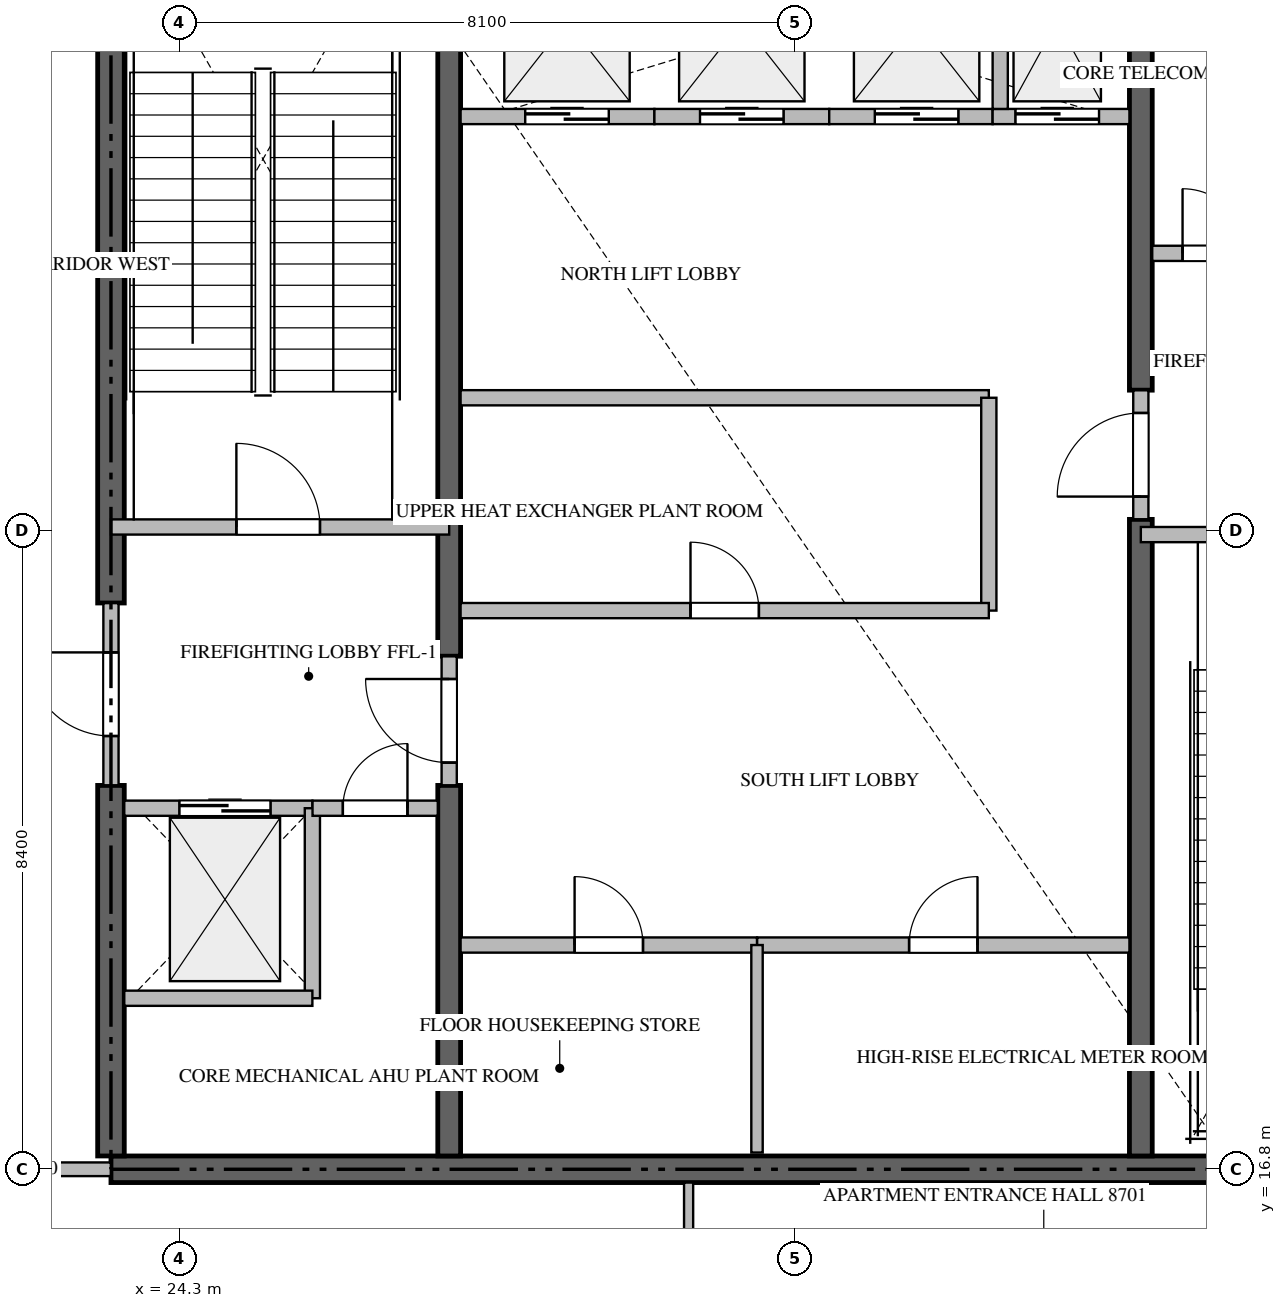
"""IFC4 building model, lengths in metres.
Left out: names, types, materials, properties, quantities, classifications, styles, units other than length and angle.
Written with IfcOpenShell. Run it as: python <this file> out.ifc"""

import sys

from ifc_helpers import new_model, si_unit, direction, frame, frame_2d, origin, place, context, subcontext, project, spatial, rectangle, extrude, source, transform, mapped, element, fill, save


model = new_model("IFC4")
c1 = context("Model", 3, precision=1e-05, world=origin(), true_north=direction((0.0, 1.0)))
c2 = subcontext(c1, "Body", "Model", "MODEL_VIEW")
j1 = project(units=[si_unit("LENGTHUNIT", "METRE"), si_unit("PLANEANGLEUNIT", "RADIAN")], contexts=[c1])
p1 = place(None, origin())
s1 = spatial("IfcSite", under=j1, at=p1, CompositionType="ELEMENT")
p2 = place(p1, origin())
s2 = spatial("IfcBuilding", under=s1, at=p2, CompositionType="ELEMENT")
p3 = place(p2, frame((0.0, 0.0, 353.85)))
s3 = spatial("IfcBuildingStorey", under=s2, at=p3, CompositionType="ELEMENT", Elevation=353.85)
p4 = place(p3, frame((23.4, 16.8, -0.26), z_axis=(0.0, 0.0, 1.0), x_axis=(1.0, 0.0, 0.0)))
e1 = element("IfcWall", 1, at=p4, inside=s3, PredefinedType="SHEAR", context=c2, shape_type="SweptSolid", body=[
    extrude(rectangle(XDim=18.0, YDim=0.35, at=frame_2d((9.0, 0.0))), origin(), (0.0, 0.0, 1.0), 5.798),
])
p5 = place(p3, frame((23.4, 16.975, -0.26), z_axis=(0.0, 0.0, 1.0), x_axis=(0.0, 1.0, 0.0)))
e2 = element("IfcWall", 2, at=p5, inside=s3, PredefinedType="SHEAR", context=c2, shape_type="SweptSolid", body=[
    extrude(rectangle(XDim=4.875, YDim=0.35, at=frame_2d((2.438, 0.0))), origin(), (0.0, 0.0, 1.0), 5.798),
])
p6 = place(p3, frame((23.4, 24.25, -0.26), z_axis=(0.0, 0.0, 1.0), x_axis=(0.0, 1.0, 0.0)))
e3 = element("IfcWall", 3, at=p6, inside=s3, PredefinedType="SHEAR", context=c2, shape_type="SweptSolid", body=[
    extrude(rectangle(XDim=9.175, YDim=0.35, at=frame_2d((4.587, 0.0))), origin(), (0.0, 0.0, 1.0), 5.798),
])
p7 = place(p3, frame((27.85, 16.975, -0.26), z_axis=(0.0, 0.0, 1.0), x_axis=(0.0, 1.0, 0.0)))
e4 = element("IfcWall", 4, at=p7, inside=s3, PredefinedType="SHEAR", context=c2, shape_type="SweptSolid", body=[
    extrude(rectangle(XDim=4.875, YDim=0.3, at=frame_2d((2.438, 0.0))), origin(), (0.0, 0.0, 1.0), 5.798),
])
p8 = place(p3, frame((27.85, 23.55, -0.26), z_axis=(0.0, 0.0, 1.0), x_axis=(0.0, 1.0, 0.0)))
e5 = element("IfcWall", 5, at=p8, inside=s3, PredefinedType="SHEAR", context=c2, shape_type="SweptSolid", body=[
    extrude(rectangle(XDim=9.875, YDim=0.3, at=frame_2d((4.938, 0.0))), origin(), (0.0, 0.0, 1.0), 5.798),
])
p9 = place(p3, frame((36.95, 16.975, -0.26), z_axis=(0.0, 0.0, 1.0), x_axis=(0.0, 1.0, 0.0)))
e6 = element("IfcWall", 6, at=p9, inside=s3, PredefinedType="SHEAR", context=c2, shape_type="SweptSolid", body=[
    extrude(rectangle(XDim=8.375, YDim=0.3, at=frame_2d((4.188, 0.0))), origin(), (0.0, 0.0, 1.0), 5.798),
])
p10 = place(p3, frame((36.95, 27.05, -0.26), z_axis=(0.0, 0.0, 1.0), x_axis=(0.0, 1.0, 0.0)))
e7 = element("IfcWall", 7, at=p10, inside=s3, PredefinedType="SHEAR", context=c2, shape_type="SweptSolid", body=[
    extrude(rectangle(XDim=6.375, YDim=0.3, at=frame_2d((3.188, 0.0))), origin(), (0.0, 0.0, 1.0), 5.798),
])
p11 = place(p3, frame((23.4, 25.25, 0.0), z_axis=(0.0, 0.0, 1.0), x_axis=(1.0, 0.0, 0.0)))
e8 = element("IfcWall", 8, at=p11, inside=s3, PredefinedType="STANDARD", context=c2, shape_type="SweptSolid", body=[
    extrude(rectangle(XDim=4.45, YDim=0.2, at=frame_2d((2.225, 0.0))), origin(), (0.0, 0.0, 1.0), 5.54),
])
p12 = place(p11, frame((1.65, 0.0, 0.0)))
e9 = element("IfcOpeningElement", 9, at=p12, cuts=e8, PredefinedType="OPENING", context=c2, shape_type="SweptSolid", body=[
    extrude(rectangle(XDim=1.1, YDim=2.15, at=frame_2d((0.55, 1.075))), frame((0.0, 0.11, 0.0), z_axis=(0.0, -1.0, 0.0), x_axis=(1.0, 0.0, 0.0)), (0.0, 0.0, 1.0), 0.22),
])
p13 = place(p3, frame((36.95, 25.15, 0.0), z_axis=(0.0, 0.0, 1.0), x_axis=(1.0, 0.0, 0.0)))
e10 = element("IfcWall", 10, at=p13, inside=s3, PredefinedType="STANDARD", context=c2, shape_type="SweptSolid", body=[
    extrude(rectangle(XDim=4.45, YDim=0.2, at=frame_2d((2.225, 0.0))), origin(), (0.0, 0.0, 1.0), 5.54),
])
p14 = place(p13, frame((1.65, 0.0, 0.0)))
e11 = element("IfcOpeningElement", 11, at=p14, cuts=e10, PredefinedType="OPENING", context=c2, shape_type="SweptSolid", body=[
    extrude(rectangle(XDim=1.1, YDim=2.15, at=frame_2d((0.55, 1.075))), frame((0.0, 0.11, 0.0), z_axis=(0.0, -1.0, 0.0), x_axis=(1.0, 0.0, 0.0)), (0.0, 0.0, 1.0), 0.22),
])
p15 = place(p3, frame((23.575, 21.55, 0.0), z_axis=(0.0, 0.0, 1.0), x_axis=(1.0, 0.0, 0.0)))
e12 = element("IfcWall", 12, at=p15, inside=s3, PredefinedType="STANDARD", context=c2, shape_type="SweptSolid", body=[
    extrude(rectangle(XDim=2.475, YDim=0.2, at=frame_2d((1.238, 0.0))), origin(), (0.0, 0.0, 1.0), 5.54),
])
p16 = place(p15, frame((0.725, 0.0, 0.0)))
e13 = element("IfcOpeningElement", 13, at=p16, cuts=e12, PredefinedType="OPENING", context=c2, shape_type="SweptSolid", body=[
    extrude(rectangle(XDim=1.2, YDim=2.2, at=frame_2d((0.6, 1.1))), frame((0.0, 0.11, 0.0), z_axis=(0.0, -1.0, 0.0), x_axis=(1.0, 0.0, 0.0)), (0.0, 0.0, 1.0), 0.22),
])
p17 = place(p3, frame((28.0, 30.65, 0.0), z_axis=(0.0, 0.0, 1.0), x_axis=(1.0, 0.0, 0.0)))
e14 = element("IfcWall", 14, at=p17, inside=s3, PredefinedType="STANDARD", context=c2, shape_type="SweptSolid", body=[
    extrude(rectangle(XDim=2.55, YDim=0.2, at=frame_2d((1.275, 0.0))), origin(), (0.0, 0.0, 1.0), 5.54),
])
p18 = place(p17, frame((0.85, 0.0, 0.0)))
e15 = element("IfcOpeningElement", 15, at=p18, cuts=e14, PredefinedType="OPENING", context=c2, shape_type="SweptSolid", body=[
    extrude(rectangle(XDim=1.1, YDim=2.2, at=frame_2d((0.55, 1.1))), frame((0.0, 0.11, 0.0), z_axis=(0.0, -1.0, 0.0), x_axis=(1.0, 0.0, 0.0)), (0.0, 0.0, 1.0), 0.22),
])
p19 = place(p3, frame((30.55, 30.65, 0.0), z_axis=(0.0, 0.0, 1.0), x_axis=(1.0, 0.0, 0.0)))
e16 = element("IfcWall", 16, at=p19, inside=s3, PredefinedType="STANDARD", context=c2, shape_type="SweptSolid", body=[
    extrude(rectangle(XDim=2.3, YDim=0.2, at=frame_2d((1.15, 0.0))), origin(), (0.0, 0.0, 1.0), 5.54),
])
p20 = place(p19, frame((0.6, 0.0, 0.0)))
e17 = element("IfcOpeningElement", 17, at=p20, cuts=e16, PredefinedType="OPENING", context=c2, shape_type="SweptSolid", body=[
    extrude(rectangle(XDim=1.1, YDim=2.2, at=frame_2d((0.55, 1.1))), frame((0.0, 0.11, 0.0), z_axis=(0.0, -1.0, 0.0), x_axis=(1.0, 0.0, 0.0)), (0.0, 0.0, 1.0), 0.22),
])
p21 = place(p3, frame((32.85, 30.65, 0.0), z_axis=(0.0, 0.0, 1.0), x_axis=(1.0, 0.0, 0.0)))
e18 = element("IfcWall", 18, at=p21, inside=s3, PredefinedType="STANDARD", context=c2, shape_type="SweptSolid", body=[
    extrude(rectangle(XDim=2.15, YDim=0.2, at=frame_2d((1.075, 0.0))), origin(), (0.0, 0.0, 1.0), 5.54),
])
p22 = place(p21, frame((0.6, 0.0, 0.0)))
e19 = element("IfcOpeningElement", 19, at=p22, cuts=e18, PredefinedType="OPENING", context=c2, shape_type="SweptSolid", body=[
    extrude(rectangle(XDim=1.1, YDim=2.2, at=frame_2d((0.55, 1.1))), frame((0.0, 0.11, 0.0), z_axis=(0.0, -1.0, 0.0), x_axis=(1.0, 0.0, 0.0)), (0.0, 0.0, 1.0), 0.22),
])
p23 = place(p3, frame((35.0, 30.65, 0.0), z_axis=(0.0, 0.0, 1.0), x_axis=(1.0, 0.0, 0.0)))
e20 = element("IfcWall", 20, at=p23, inside=s3, PredefinedType="STANDARD", context=c2, shape_type="SweptSolid", body=[
    extrude(rectangle(XDim=1.8, YDim=0.2, at=frame_2d((0.9, 0.0))), origin(), (0.0, 0.0, 1.0), 5.54),
])
p24 = place(p23, frame((0.3, 0.0, 0.0)))
e21 = element("IfcOpeningElement", 21, at=p24, cuts=e20, PredefinedType="OPENING", context=c2, shape_type="SweptSolid", body=[
    extrude(rectangle(XDim=1.1, YDim=2.2, at=frame_2d((0.55, 1.1))), frame((0.0, 0.11, 0.0), z_axis=(0.0, -1.0, 0.0), x_axis=(1.0, 0.0, 0.0)), (0.0, 0.0, 1.0), 0.22),
])
p25 = place(p3, frame((35.1, 30.75, 0.0), z_axis=(0.0, 0.0, 1.0), x_axis=(0.0, 1.0, 0.0)))
e22 = element("IfcWall", 22, at=p25, inside=s3, PredefinedType="STANDARD", context=c2, shape_type="SweptSolid", body=[
    extrude(rectangle(XDim=2.675, YDim=0.2, at=frame_2d((1.337, 0.0))), origin(), (0.0, 0.0, 1.0), 5.54),
])
p26 = place(p3, frame((26.05, 19.05, 0.0), z_axis=(0.0, 0.0, 1.0), x_axis=(0.0, 1.0, 0.0)))
e23 = element("IfcWall", 23, at=p26, inside=s3, PredefinedType="STANDARD", context=c2, shape_type="SweptSolid", body=[
    extrude(rectangle(XDim=2.5, YDim=0.2, at=frame_2d((1.25, 0.0))), origin(), (0.0, 0.0, 1.0), 5.54),
])
p27 = place(p3, frame((23.575, 19.05, 0.0), z_axis=(0.0, 0.0, 1.0), x_axis=(1.0, 0.0, 0.0)))
e24 = element("IfcWall", 24, at=p27, inside=s3, PredefinedType="STANDARD", context=c2, shape_type="SweptSolid", body=[
    extrude(rectangle(XDim=2.475, YDim=0.2, at=frame_2d((1.238, 0.0))), origin(), (0.0, 0.0, 1.0), 5.54),
])
p28 = place(p3, frame((26.052, 21.55, 0.0), z_axis=(0.0, 0.0, 1.0), x_axis=(1.0, 0.0, 0.0)))
e25 = element("IfcWall", 25, at=p28, inside=s3, PredefinedType="STANDARD", context=c2, shape_type="SweptSolid", body=[
    extrude(rectangle(XDim=1.648, YDim=0.2, at=frame_2d((0.824, 0.0))), origin(), (0.0, 0.0, 1.0), 5.54),
])
p29 = place(p28, frame((0.399, 0.0, 0.0)))
e26 = element("IfcOpeningElement", 26, at=p29, cuts=e25, PredefinedType="OPENING", context=c2, shape_type="SweptSolid", body=[
    extrude(rectangle(XDim=0.85, YDim=2.1, at=frame_2d((0.425, 1.05))), frame((0.0, 0.11, 0.0), z_axis=(0.0, -1.0, 0.0), x_axis=(1.0, 0.0, 0.0)), (0.0, 0.0, 1.0), 0.22),
])
p30 = place(p3, frame((37.1, 28.85, 0.0), z_axis=(0.0, 0.0, 1.0), x_axis=(1.0, 0.0, 0.0)))
e27 = element("IfcWall", 27, at=p30, inside=s3, PredefinedType="STANDARD", context=c2, shape_type="SweptSolid", body=[
    extrude(rectangle(XDim=1.648, YDim=0.2, at=frame_2d((0.824, 0.0))), origin(), (0.0, 0.0, 1.0), 5.54),
])
p31 = place(p30, frame((0.399, 0.0, 0.0)))
e28 = element("IfcOpeningElement", 28, at=p31, cuts=e27, PredefinedType="OPENING", context=c2, shape_type="SweptSolid", body=[
    extrude(rectangle(XDim=0.85, YDim=2.1, at=frame_2d((0.425, 1.05))), frame((0.0, 0.11, 0.0), z_axis=(0.0, -1.0, 0.0), x_axis=(1.0, 0.0, 0.0)), (0.0, 0.0, 1.0), 0.22),
])
p32 = place(p3, frame((23.4, 21.852, 0.0), z_axis=(0.0, 0.0, 1.0), x_axis=(0.0, 1.0, 0.0)))
e29 = element("IfcWall", 29, at=p32, inside=s3, PredefinedType="STANDARD", context=c2, shape_type="SweptSolid", body=[
    extrude(rectangle(XDim=2.396, YDim=0.2, at=frame_2d((1.198, 0.0))), origin(), (0.0, 0.0, 1.0), 5.54),
])
p33 = place(p32, frame((0.648, 0.0, 0.0)))
e30 = element("IfcOpeningElement", 30, at=p33, cuts=e29, PredefinedType="OPENING", context=c2, shape_type="SweptSolid", body=[
    extrude(rectangle(XDim=1.1, YDim=2.15, at=frame_2d((0.55, 1.075))), frame((0.0, 0.11, 0.0), z_axis=(0.0, -1.0, 0.0), x_axis=(1.0, 0.0, 0.0)), (0.0, 0.0, 1.0), 0.22),
])
p34 = place(p3, frame((27.85, 21.852, 0.0), z_axis=(0.0, 0.0, 1.0), x_axis=(0.0, 1.0, 0.0)))
e31 = element("IfcWall", 31, at=p34, inside=s3, PredefinedType="STANDARD", context=c2, shape_type="SweptSolid", body=[
    extrude(rectangle(XDim=1.696, YDim=0.2, at=frame_2d((0.848, 0.0))), origin(), (0.0, 0.0, 1.0), 5.54),
])
p35 = place(p34, frame((0.298, 0.0, 0.0)))
e32 = element("IfcOpeningElement", 32, at=p35, cuts=e31, PredefinedType="OPENING", context=c2, shape_type="SweptSolid", body=[
    extrude(rectangle(XDim=1.1, YDim=2.15, at=frame_2d((0.55, 1.075))), frame((0.0, 0.11, 0.0), z_axis=(0.0, -1.0, 0.0), x_axis=(1.0, 0.0, 0.0)), (0.0, 0.0, 1.0), 0.22),
])
p36 = place(p3, frame((36.95, 25.352, 0.0), z_axis=(0.0, 0.0, 1.0), x_axis=(0.0, 1.0, 0.0)))
e33 = element("IfcWall", 33, at=p36, inside=s3, PredefinedType="STANDARD", context=c2, shape_type="SweptSolid", body=[
    extrude(rectangle(XDim=1.696, YDim=0.2, at=frame_2d((0.848, 0.0))), origin(), (0.0, 0.0, 1.0), 5.54),
])
p37 = place(p36, frame((0.298, 0.0, 0.0)))
e34 = element("IfcOpeningElement", 34, at=p37, cuts=e33, PredefinedType="OPENING", context=c2, shape_type="SweptSolid", body=[
    extrude(rectangle(XDim=1.1, YDim=2.15, at=frame_2d((0.55, 1.075))), frame((0.0, 0.11, 0.0), z_axis=(0.0, -1.0, 0.0), x_axis=(1.0, 0.0, 0.0)), (0.0, 0.0, 1.0), 0.22),
])
p38 = place(p3, frame((28.0, 19.75, 0.0), z_axis=(0.0, 0.0, 1.0), x_axis=(1.0, 0.0, 0.0)))
e35 = element("IfcWall", 35, at=p38, inside=s3, PredefinedType="STANDARD", context=c2, shape_type="SweptSolid", body=[
    extrude(rectangle(XDim=3.9, YDim=0.2, at=frame_2d((1.95, 0.0))), origin(), (0.0, 0.0, 1.0), 5.54),
])
p39 = place(p38, frame((1.5, 0.0, 0.0)))
e36 = element("IfcOpeningElement", 36, at=p39, cuts=e35, PredefinedType="OPENING", context=c2, shape_type="SweptSolid", body=[
    extrude(rectangle(XDim=0.9, YDim=2.1, at=frame_2d((0.45, 1.05))), frame((0.0, 0.11, 0.0), z_axis=(0.0, -1.0, 0.0), x_axis=(1.0, 0.0, 0.0)), (0.0, 0.0, 1.0), 0.22),
])
p40 = place(p3, frame((31.902, 19.75, 0.0), z_axis=(0.0, 0.0, 1.0), x_axis=(1.0, 0.0, 0.0)))
e37 = element("IfcWall", 37, at=p40, inside=s3, PredefinedType="STANDARD", context=c2, shape_type="SweptSolid", body=[
    extrude(rectangle(XDim=4.898, YDim=0.2, at=frame_2d((2.449, 0.0))), origin(), (0.0, 0.0, 1.0), 5.54),
])
p41 = place(p40, frame((1.999, 0.0, 0.0)))
e38 = element("IfcOpeningElement", 38, at=p41, cuts=e37, PredefinedType="OPENING", context=c2, shape_type="SweptSolid", body=[
    extrude(rectangle(XDim=0.9, YDim=2.1, at=frame_2d((0.45, 1.05))), frame((0.0, 0.11, 0.0), z_axis=(0.0, -1.0, 0.0), x_axis=(1.0, 0.0, 0.0)), (0.0, 0.0, 1.0), 0.22),
])
p42 = place(p3, frame((31.9, 17.02, 0.0), z_axis=(0.0, 0.0, 1.0), x_axis=(0.0, 1.0, 0.0)))
e39 = element("IfcWall", 39, at=p42, inside=s3, PredefinedType="PARTITIONING", context=c2, shape_type="SweptSolid", body=[
    extrude(rectangle(XDim=2.73, YDim=0.15, at=frame_2d((1.365, 0.0))), origin(), (0.0, 0.0, 1.0), 5.54),
])
p43 = place(p3, frame((28.0, 26.95, 0.0), z_axis=(0.0, 0.0, 1.0), x_axis=(1.0, 0.0, 0.0)))
e40 = element("IfcWall", 40, at=p43, inside=s3, PredefinedType="STANDARD", context=c2, shape_type="SweptSolid", body=[
    extrude(rectangle(XDim=6.95, YDim=0.2, at=frame_2d((3.475, 0.0))), origin(), (0.0, 0.0, 1.0), 5.54),
])
p44 = place(p3, frame((34.95, 24.15, 0.0), z_axis=(0.0, 0.0, 1.0), x_axis=(0.0, 1.0, 0.0)))
e41 = element("IfcWall", 41, at=p44, inside=s3, PredefinedType="STANDARD", context=c2, shape_type="SweptSolid", body=[
    extrude(rectangle(XDim=2.8, YDim=0.2, at=frame_2d((1.4, 0.0))), origin(), (0.0, 0.0, 1.0), 5.54),
])
p45 = place(p3, frame((28.0, 24.15, 0.0), z_axis=(0.0, 0.0, 1.0), x_axis=(1.0, 0.0, 0.0)))
e42 = element("IfcWall", 42, at=p45, inside=s3, PredefinedType="STANDARD", context=c2, shape_type="SweptSolid", body=[
    extrude(rectangle(XDim=6.95, YDim=0.2, at=frame_2d((3.475, 0.0))), origin(), (0.0, 0.0, 1.0), 5.54),
])
p46 = place(p45, frame((3.025, 0.0, 0.0)))
e43 = element("IfcOpeningElement", 43, at=p46, cuts=e42, PredefinedType="OPENING", context=c2, shape_type="SweptSolid", body=[
    extrude(rectangle(XDim=0.9, YDim=2.1, at=frame_2d((0.45, 1.05))), frame((0.0, 0.11, 0.0), z_axis=(0.0, -1.0, 0.0), x_axis=(1.0, 0.0, 0.0)), (0.0, 0.0, 1.0), 0.22),
])
p47 = place(p3, frame((20.902, 16.8, 0.0), z_axis=(0.0, 0.0, 1.0), x_axis=(1.0, 0.0, 0.0)))
e44 = element("IfcWall", 44, at=p47, inside=s3, PredefinedType="PARTITIONING", context=c2, shape_type="SweptSolid", body=[
    extrude(rectangle(XDim=2.496, YDim=0.18, at=frame_2d((1.248, 0.0))), origin(), (0.0, 0.0, 1.0), 5.54),
])
p48 = place(p3, frame((31.0, 14.652, 0.0), z_axis=(0.0, 0.0, 1.0), x_axis=(0.0, 1.0, 0.0)))
e45 = element("IfcWall", 45, at=p48, inside=s3, PredefinedType="PARTITIONING", context=c2, shape_type="SweptSolid", body=[
    extrude(rectangle(XDim=1.973, YDim=0.12, at=frame_2d((0.986, 0.0))), origin(), (0.0, 0.0, 1.0), 5.54),
])
m1 = source(origin(), c2, "Body", "SweptSolid", [
    extrude(rectangle(XDim=1.1, YDim=2.15, at=frame_2d((0.55, 1.075))), frame((0.0, 0.025, 0.0), z_axis=(0.0, -1.0, 0.0), x_axis=(1.0, 0.0, 0.0)), (0.0, 0.0, 1.0), 0.05),
])
p49 = place(p12, origin())
e46 = element("IfcDoor", 46, at=p49, inside=s3, OperationType="SINGLE_SWING_LEFT", PredefinedType="DOOR", context=c2, shape_type="MappedRepresentation", body=[
    mapped(m1, transform((0.0, 0.0, 0.0), scale=1.0)),
])
fill(e9, e46)
m2 = source(origin(), c2, "Body", "SweptSolid", [
    extrude(rectangle(XDim=1.2, YDim=2.2, at=frame_2d((0.6, 1.1))), frame((0.0, 0.025, 0.0), z_axis=(0.0, -1.0, 0.0), x_axis=(1.0, 0.0, 0.0)), (0.0, 0.0, 1.0), 0.05),
])
p50 = place(p16, origin())
e47 = element("IfcDoor", 47, at=p50, inside=s3, OperationType="DOUBLE_DOOR_SLIDING", PredefinedType="DOOR", context=c2, shape_type="MappedRepresentation", body=[
    mapped(m2, transform((0.0, 0.0, 0.0), scale=1.0)),
])
fill(e13, e47)
m3 = source(origin(), c2, "Body", "SweptSolid", [
    extrude(rectangle(XDim=1.1, YDim=2.2, at=frame_2d((0.55, 1.1))), frame((0.0, 0.025, 0.0), z_axis=(0.0, -1.0, 0.0), x_axis=(1.0, 0.0, 0.0)), (0.0, 0.0, 1.0), 0.05),
])
p51 = place(p18, origin())
e48 = element("IfcDoor", 48, at=p51, inside=s3, OperationType="DOUBLE_DOOR_SLIDING", PredefinedType="DOOR", context=c2, shape_type="MappedRepresentation", body=[
    mapped(m3, transform((0.0, 0.0, 0.0), scale=1.0)),
])
fill(e15, e48)
p52 = place(p20, origin())
e49 = element("IfcDoor", 49, at=p52, inside=s3, OperationType="DOUBLE_DOOR_SLIDING", PredefinedType="DOOR", context=c2, shape_type="MappedRepresentation", body=[
    mapped(m3, transform((0.0, 0.0, 0.0), scale=1.0)),
])
fill(e17, e49)
p53 = place(p22, origin())
e50 = element("IfcDoor", 50, at=p53, inside=s3, OperationType="DOUBLE_DOOR_SLIDING", PredefinedType="DOOR", context=c2, shape_type="MappedRepresentation", body=[
    mapped(m3, transform((0.0, 0.0, 0.0), scale=1.0)),
])
fill(e19, e50)
p54 = place(p24, origin())
e51 = element("IfcDoor", 51, at=p54, inside=s3, OperationType="DOUBLE_DOOR_SLIDING", PredefinedType="DOOR", context=c2, shape_type="MappedRepresentation", body=[
    mapped(m3, transform((0.0, 0.0, 0.0), scale=1.0)),
])
fill(e21, e51)
m4 = source(origin(), c2, "Body", "SweptSolid", [
    extrude(rectangle(XDim=0.85, YDim=2.1, at=frame_2d((0.425, 1.05))), frame((0.0, 0.025, 0.0), z_axis=(0.0, -1.0, 0.0), x_axis=(1.0, 0.0, 0.0)), (0.0, 0.0, 1.0), 0.05),
])
p55 = place(p29, origin())
e52 = element("IfcDoor", 52, at=p55, inside=s3, OperationType="SINGLE_SWING_RIGHT", PredefinedType="DOOR", context=c2, shape_type="MappedRepresentation", body=[
    mapped(m4, transform((0.0, 0.0, 0.0), scale=1.0)),
])
fill(e26, e52)
p56 = place(p31, origin())
e53 = element("IfcDoor", 53, at=p56, inside=s3, OperationType="SINGLE_SWING_LEFT", PredefinedType="DOOR", context=c2, shape_type="MappedRepresentation", body=[
    mapped(m4, transform((0.0, 0.0, 0.0), scale=1.0)),
])
fill(e28, e53)
p57 = place(p33, origin())
e54 = element("IfcDoor", 54, at=p57, inside=s3, OperationType="SINGLE_SWING_RIGHT", PredefinedType="DOOR", context=c2, shape_type="MappedRepresentation", body=[
    mapped(m1, transform((0.0, 0.0, 0.0), scale=1.0)),
])
fill(e30, e54)
p58 = place(p35, origin())
e55 = element("IfcDoor", 55, at=p58, inside=s3, OperationType="SINGLE_SWING_RIGHT", PredefinedType="DOOR", context=c2, shape_type="MappedRepresentation", body=[
    mapped(m1, transform((0.0, 0.0, 0.0), scale=1.0)),
])
fill(e32, e55)
p59 = place(p37, origin())
e56 = element("IfcDoor", 56, at=p59, inside=s3, OperationType="SINGLE_SWING_LEFT", PredefinedType="DOOR", context=c2, shape_type="MappedRepresentation", body=[
    mapped(m1, transform((0.0, 0.0, 0.0), scale=1.0)),
])
fill(e34, e56)
m5 = source(origin(), c2, "Body", "SweptSolid", [
    extrude(rectangle(XDim=0.9, YDim=2.1, at=frame_2d((0.45, 1.05))), frame((0.0, 0.025, 0.0), z_axis=(0.0, -1.0, 0.0), x_axis=(1.0, 0.0, 0.0)), (0.0, 0.0, 1.0), 0.05),
])
p60 = place(p39, origin())
e57 = element("IfcDoor", 57, at=p60, inside=s3, OperationType="SINGLE_SWING_LEFT", PredefinedType="DOOR", context=c2, shape_type="MappedRepresentation", body=[
    mapped(m5, transform((0.0, 0.0, 0.0), scale=1.0)),
])
fill(e36, e57)
p61 = place(p41, origin())
e58 = element("IfcDoor", 58, at=p61, inside=s3, OperationType="SINGLE_SWING_RIGHT", PredefinedType="DOOR", context=c2, shape_type="MappedRepresentation", body=[
    mapped(m5, transform((0.0, 0.0, 0.0), scale=1.0)),
])
fill(e38, e58)
p62 = place(p46, origin())
e59 = element("IfcDoor", 59, at=p62, inside=s3, OperationType="SINGLE_SWING_LEFT", PredefinedType="DOOR", context=c2, shape_type="MappedRepresentation", body=[
    mapped(m5, transform((0.0, 0.0, 0.0), scale=1.0)),
])
fill(e43, e59)
save(model, sys.argv[1])
